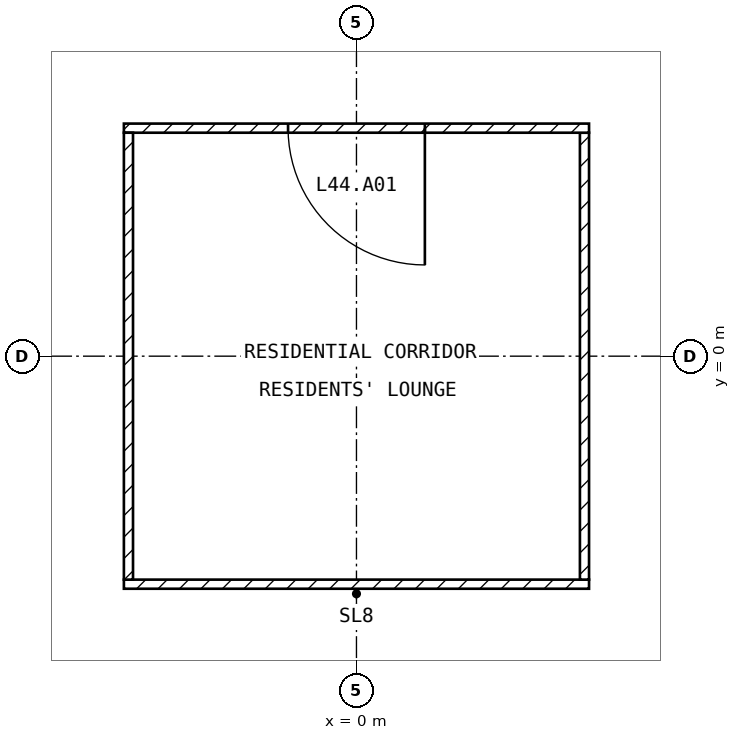
"""IFC4 building model, lengths in metres.
Left out: names, types, materials, properties, quantities, classifications, styles, units other than length and angle.
Written with IfcOpenShell. Run it as: python <this file> out.ifc"""

import sys

from ifc_helpers import new_model, si_unit, direction, frame, frame_2d, origin, place, context, subcontext, project, spatial, rectangle, extrude, element, fill, save


model = new_model("IFC4")
c1 = context("Model", 3, precision=1e-05, world=origin(), true_north=direction((0.0, 1.0)))
c2 = subcontext(c1, "Body", "Model", "MODEL_VIEW")
j1 = project(units=[si_unit("LENGTHUNIT", "METRE"), si_unit("PLANEANGLEUNIT", "RADIAN")], contexts=[c1])
p1 = place(None, origin())
s1 = spatial("IfcSite", under=j1, at=p1, CompositionType="ELEMENT")
p2 = place(p1, origin())
s2 = spatial("IfcBuilding", under=s1, at=p2, CompositionType="ELEMENT")
p3 = place(p2, frame((0.0, 0.0, 180.6)))
s3 = spatial("IfcBuildingStorey", under=s2, at=p3, CompositionType="ELEMENT", Elevation=180.6)
p4 = place(p3, frame((-3.06, -3.0, 0.0), z_axis=(0.0, 0.0, 1.0), x_axis=(1.0, 0.0, 0.0)))
e1 = element("IfcWall", 1, at=p4, inside=s3, PredefinedType="PARTITIONING", context=c2, shape_type="SweptSolid", body=[
    extrude(rectangle(XDim=6.12, YDim=0.12, at=frame_2d((3.06, 0.0))), origin(), (0.0, 0.0, 1.0), 3.25),
])
p5 = place(p3, frame((3.0, -2.94, 0.0), z_axis=(0.0, 0.0, 1.0), x_axis=(0.0, 1.0, 0.0)))
e2 = element("IfcWall", 2, at=p5, inside=s3, PredefinedType="PARTITIONING", context=c2, shape_type="SweptSolid", body=[
    extrude(rectangle(XDim=5.88, YDim=0.12, at=frame_2d((2.94, 0.0))), origin(), (0.0, 0.0, 1.0), 3.25),
])
p6 = place(p3, frame((3.06, 3.0, 0.0), z_axis=(0.0, 0.0, 1.0), x_axis=(-1.0, 0.0, 0.0)))
e3 = element("IfcWall", 3, at=p6, inside=s3, PredefinedType="PARTITIONING", context=c2, shape_type="SweptSolid", body=[
    extrude(rectangle(XDim=6.12, YDim=0.12, at=frame_2d((3.06, 0.0))), origin(), (0.0, 0.0, 1.0), 3.25),
])
p7 = place(p6, frame((2.16, 0.0, 0.0)))
e4 = element("IfcOpeningElement", 4, at=p7, cuts=e3, PredefinedType="OPENING", context=c2, shape_type="SweptSolid", body=[
    extrude(rectangle(XDim=1.8, YDim=2.1, at=frame_2d((0.9, 1.05))), frame((0.0, 0.07, 0.0), z_axis=(0.0, -1.0, 0.0), x_axis=(1.0, 0.0, 0.0)), (0.0, 0.0, 1.0), 0.14),
])
p8 = place(p3, frame((-3.0, 2.94, 0.0), z_axis=(0.0, 0.0, 1.0), x_axis=(0.0, -1.0, 0.0)))
e5 = element("IfcWall", 5, at=p8, inside=s3, PredefinedType="PARTITIONING", context=c2, shape_type="SweptSolid", body=[
    extrude(rectangle(XDim=5.88, YDim=0.12, at=frame_2d((2.94, 0.0))), origin(), (0.0, 0.0, 1.0), 3.25),
])
p9 = place(p7, origin())
e6 = element("IfcDoor", 6, at=p9, inside=s3, OperationType="SINGLE_SWING_LEFT", PredefinedType="DOOR", context=c2, shape_type="SweptSolid", body=[
    extrude(rectangle(XDim=1.8, YDim=2.1, at=frame_2d((0.9, 1.05))), frame((0.0, 0.025, 0.0), z_axis=(0.0, -1.0, 0.0), x_axis=(1.0, 0.0, 0.0)), (0.0, 0.0, 1.0), 0.05),
])
fill(e4, e6)
save(model, sys.argv[1])
